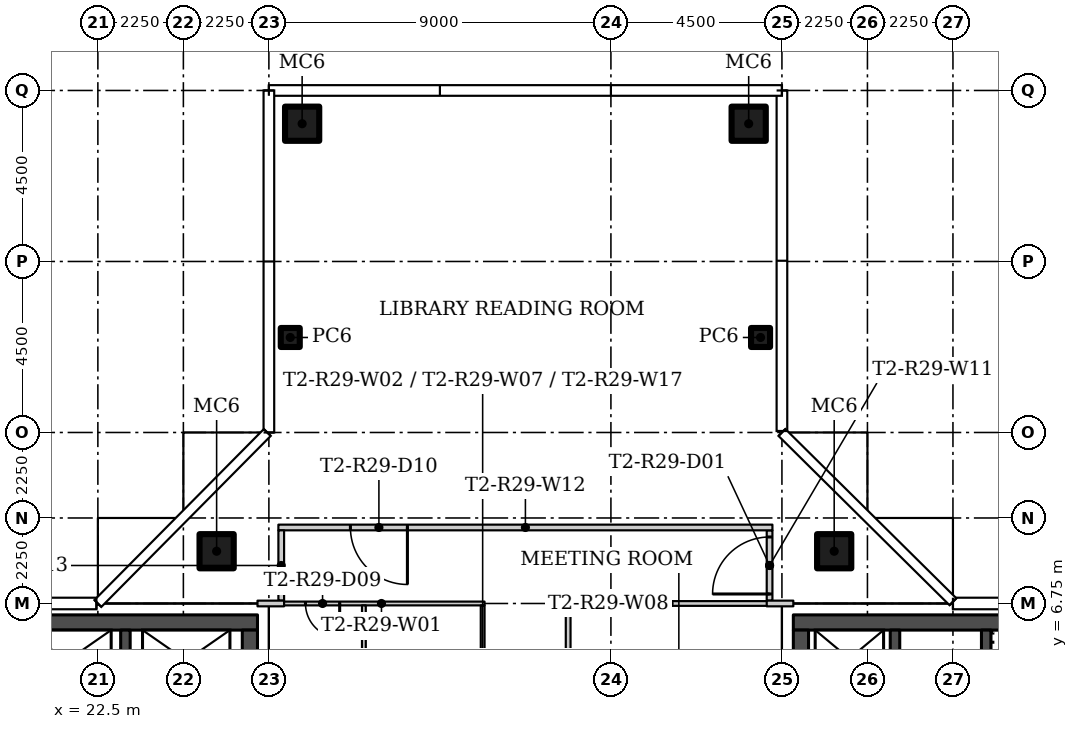
"""IFC4 building model, lengths in metres.
Left out: names, types, materials, properties, quantities, classifications, styles, units other than length and angle.
Written with IfcOpenShell. Run it as: python <this file> out.ifc"""

import sys

from ifc_helpers import new_model, si_unit, direction, frame, frame_2d, origin, origin_2d, place, context, subcontext, project, spatial, rectangle, hollow_rectangle, extrude, element, fill, save


model = new_model("IFC4")
c1 = context("Model", 3, precision=1e-05, world=origin(), true_north=direction((0.0, 1.0)))
c2 = subcontext(c1, "Body", "Model", "MODEL_VIEW")
j1 = project(units=[si_unit("LENGTHUNIT", "METRE"), si_unit("PLANEANGLEUNIT", "RADIAN")], contexts=[c1])
p1 = place(None, origin())
s1 = spatial("IfcSite", under=j1, at=p1, CompositionType="ELEMENT")
p2 = place(p1, origin())
s2 = spatial("IfcBuilding", under=s1, at=p2, CompositionType="ELEMENT")
p3 = place(p2, frame((0.0, 0.0, 261.6)))
s3 = spatial("IfcBuildingStorey", under=s2, at=p3, CompositionType="ELEMENT", Elevation=261.6)
for number, where in (
    (1, (25.625, 8.125, 0.0)),
    (2, (41.875, 8.125, 0.0)),
):
    element("IfcColumn", number, at=place(p3, frame(where)), inside=s3, PredefinedType="COLUMN", context=c2, shape_type="SweptSolid", body=[
        extrude(hollow_rectangle(XDim=0.9, YDim=0.9, WallThickness=0.036, at=origin_2d()), origin(), (0.0, 0.0, 1.0), 3.55),
    ])
p4 = place(p3, frame((39.938, 13.75, 0.0)))
e3 = element("IfcColumn", 3, at=p4, inside=s3, PredefinedType="COLUMN", context=c2, shape_type="SweptSolid", body=[
    extrude(hollow_rectangle(XDim=0.5, YDim=0.5, WallThickness=0.016, at=origin_2d()), origin(), (0.0, 0.0, 1.0), 3.55),
])
p5 = place(p3, frame((39.625, 19.375, 0.0)))
e4 = element("IfcColumn", 4, at=p5, inside=s3, PredefinedType="COLUMN", context=c2, shape_type="SweptSolid", body=[
    extrude(hollow_rectangle(XDim=0.9, YDim=0.9, WallThickness=0.036, at=origin_2d()), origin(), (0.0, 0.0, 1.0), 3.55),
])
p6 = place(p3, frame((27.562, 13.75, 0.0)))
e5 = element("IfcColumn", 5, at=p6, inside=s3, PredefinedType="COLUMN", context=c2, shape_type="SweptSolid", body=[
    extrude(hollow_rectangle(XDim=0.5, YDim=0.5, WallThickness=0.016, at=origin_2d()), origin(), (0.0, 0.0, 1.0), 3.55),
])
p7 = place(p3, frame((27.875, 19.375, 0.0)))
e6 = element("IfcColumn", 6, at=p7, inside=s3, PredefinedType="COLUMN", context=c2, shape_type="SweptSolid", body=[
    extrude(hollow_rectangle(XDim=0.9, YDim=0.9, WallThickness=0.036, at=origin_2d()), origin(), (0.0, 0.0, 1.0), 3.55),
])
p8 = place(p3, frame((32.675, 6.75, 0.0), z_axis=(0.0, 0.0, 1.0), x_axis=(-1.0, 0.0, 0.0)))
e7 = element("IfcWall", 7, at=p8, inside=s3, PredefinedType="PARTITIONING", context=c2, shape_type="SweptSolid", body=[
    extrude(rectangle(XDim=5.425, YDim=0.1, at=frame_2d((2.712, 0.0))), origin(), (0.0, 0.0, 1.0), 3.55),
])
p9 = place(p8, frame((3.812, 0.0, 0.0)))
e8 = element("IfcOpeningElement", 8, at=p9, cuts=e7, PredefinedType="OPENING", context=c2, shape_type="SweptSolid", body=[
    extrude(rectangle(XDim=0.9, YDim=2.1, at=frame_2d((0.45, 1.05))), frame((0.0, 0.06, 0.0), z_axis=(0.0, -1.0, 0.0), x_axis=(1.0, 0.0, 0.0)), (0.0, 0.0, 1.0), 0.12),
])
p10 = place(p3, frame((32.625, 2.5, 0.0), z_axis=(0.0, 0.0, 1.0), x_axis=(0.0, 1.0, 0.0)))
e9 = element("IfcWall", 9, at=p10, inside=s3, PredefinedType="PARTITIONING", context=c2, shape_type="SweptSolid", body=[
    extrude(rectangle(XDim=4.2, YDim=0.1, at=frame_2d((2.1, 0.0))), origin(), (0.0, 0.0, 1.0), 3.55),
])
p11 = place(p10, frame((1.65, 0.0, 0.0)))
e10 = element("IfcOpeningElement", 10, at=p11, cuts=e9, PredefinedType="OPENING", context=c2, shape_type="SweptSolid", body=[
    extrude(rectangle(XDim=0.9, YDim=2.1, at=frame_2d((0.45, 1.05))), frame((0.0, 0.06, 0.0), z_axis=(0.0, -1.0, 0.0), x_axis=(1.0, 0.0, 0.0)), (0.0, 0.0, 1.0), 0.12),
])
p12 = place(p3, frame((34.875, 6.688, 0.0), z_axis=(0.0, 0.0, 1.0), x_axis=(0.0, -1.0, 0.0)))
e11 = element("IfcWall", 11, at=p12, inside=s3, PredefinedType="PARTITIONING", context=c2, shape_type="SweptSolid", body=[
    extrude(rectangle(XDim=4.175, YDim=0.125, at=frame_2d((2.087, 0.0))), origin(), (0.0, 0.0, 1.0), 3.55),
])
p13 = place(p12, frame((1.637, 0.0, 0.0)))
e12 = element("IfcOpeningElement", 12, at=p13, cuts=e11, PredefinedType="OPENING", context=c2, shape_type="SweptSolid", body=[
    extrude(rectangle(XDim=0.9, YDim=2.1, at=frame_2d((0.45, 1.05))), frame((0.0, 0.073, 0.0), z_axis=(0.0, -1.0, 0.0), x_axis=(1.0, 0.0, 0.0)), (0.0, 0.0, 1.0), 0.145),
])
p14 = place(p3, frame((40.25, 6.75, 0.0), z_axis=(0.0, 0.0, 1.0), x_axis=(-1.0, 0.0, 0.0)))
e13 = element("IfcWall", 13, at=p14, inside=s3, PredefinedType="PARTITIONING", context=c2, shape_type="SweptSolid", body=[
    extrude(rectangle(XDim=5.437, YDim=0.125, at=frame_2d((2.719, 0.0))), origin(), (0.0, 0.0, 1.0), 3.55),
])
p15 = place(p3, frame((40.175, 6.825, 0.0), z_axis=(0.0, 0.0, 1.0), x_axis=(0.0, 1.0, 0.0)))
e14 = element("IfcWall", 14, at=p15, inside=s3, PredefinedType="PARTITIONING", context=c2, shape_type="SweptSolid", body=[
    extrude(rectangle(XDim=1.85, YDim=0.15, at=frame_2d((0.925, 0.0))), origin(), (0.0, 0.0, 1.0), 3.55),
])
p16 = place(p15, frame((0.175, 0.0, 0.0)))
e15 = element("IfcOpeningElement", 15, at=p16, cuts=e14, PredefinedType="OPENING", context=c2, shape_type="SweptSolid", body=[
    extrude(rectangle(XDim=1.5, YDim=2.1, at=frame_2d((0.75, 1.05))), frame((0.0, 0.085, 0.0), z_axis=(0.0, -1.0, 0.0), x_axis=(1.0, 0.0, 0.0)), (0.0, 0.0, 1.0), 0.17),
])
p17 = place(p3, frame((40.25, 8.75, 0.0), z_axis=(0.0, 0.0, 1.0), x_axis=(-1.0, 0.0, 0.0)))
e16 = element("IfcWall", 16, at=p17, inside=s3, PredefinedType="PARTITIONING", context=c2, shape_type="SweptSolid", body=[
    extrude(rectangle(XDim=13.0, YDim=0.15, at=frame_2d((6.5, 0.0))), origin(), (0.0, 0.0, 1.0), 3.55),
])
p18 = place(p17, frame((9.605, 0.0, 0.0)))
e17 = element("IfcOpeningElement", 17, at=p18, cuts=e16, PredefinedType="OPENING", context=c2, shape_type="SweptSolid", body=[
    extrude(rectangle(XDim=1.5, YDim=2.1, at=frame_2d((0.75, 1.05))), frame((0.0, 0.085, 0.0), z_axis=(0.0, -1.0, 0.0), x_axis=(1.0, 0.0, 0.0)), (0.0, 0.0, 1.0), 0.17),
])
p19 = place(p3, frame((27.325, 8.675, 0.0), z_axis=(0.0, 0.0, 1.0), x_axis=(0.0, -1.0, 0.0)))
e18 = element("IfcWall", 18, at=p19, inside=s3, PredefinedType="PARTITIONING", context=c2, shape_type="SweptSolid", body=[
    extrude(rectangle(XDim=1.85, YDim=0.15, at=frame_2d((0.925, 0.0))), origin(), (0.0, 0.0, 1.0), 3.55),
])
p20 = place(p3, frame((29.5, 6.7, 0.0), z_axis=(0.0, 0.0, 1.0), x_axis=(0.0, -1.0, 0.0)))
e19 = element("IfcWall", 19, at=p20, inside=s3, PredefinedType="PARTITIONING", context=c2, shape_type="SweptSolid", body=[
    extrude(rectangle(XDim=4.2, YDim=0.1, at=frame_2d((2.1, 0.0))), origin(), (0.0, 0.0, 1.0), 3.55),
])
for number, where, z_axis, x_axis in (
    (20, (27.4, 6.75, 0.0), (0.0, 0.0, 1.0), (-1.0, 0.0, 0.0)),
    (21, (40.8, 6.75, 0.0), (0.0, 0.0, 1.0), (-1.0, 0.0, 0.0)),
):
    element("IfcWall", number, at=place(p3, frame(where, z_axis=z_axis, x_axis=x_axis)), inside=s3, PredefinedType="PARTITIONING", context=c2, shape_type="SweptSolid", body=[
        extrude(rectangle(XDim=0.7, YDim=0.15, at=frame_2d((0.35, 0.0))), origin(), (0.0, 0.0, 1.0), 3.55),
    ])
p21 = place(p3, frame((13.8, 6.25, 0.0)))
e22 = element("IfcWall", 22, at=p21, inside=s3, PredefinedType="SHEAR", context=c2, shape_type="SweptSolid", body=[
    extrude(rectangle(XDim=12.9, YDim=0.4, at=frame_2d((6.45, 0.0))), origin(), (0.0, 0.0, 1.0), 3.55),
])
p22 = place(p3, frame((26.5, 6.05, 0.0), z_axis=(0.0, 0.0, 1.0), x_axis=(0.0, -1.0, 0.0)))
e23 = element("IfcWall", 23, at=p22, inside=s3, PredefinedType="SHEAR", context=c2, shape_type="SweptSolid", body=[
    extrude(rectangle(XDim=12.1, YDim=0.4, at=frame_2d((6.05, 0.0))), origin(), (0.0, 0.0, 1.0), 3.55),
])
p23 = place(p22, frame((10.1, 0.0, 0.0)))
e24 = element("IfcOpeningElement", 24, at=p23, cuts=e23, PredefinedType="OPENING", context=c2, shape_type="SweptSolid", body=[
    extrude(rectangle(XDim=1.2, YDim=2.1, at=frame_2d((0.6, 1.05))), frame((0.0, 0.21, 0.0), z_axis=(0.0, -1.0, 0.0), x_axis=(1.0, 0.0, 0.0)), (0.0, 0.0, 1.0), 0.42),
])
p24 = place(p22, frame((3.9, 0.0, 0.0)))
e25 = element("IfcOpeningElement", 25, at=p24, cuts=e23, PredefinedType="OPENING", context=c2, shape_type="SweptSolid", body=[
    extrude(rectangle(XDim=1.8, YDim=2.4, at=frame_2d((0.9, 1.2))), frame((0.0, 0.21, 0.0), z_axis=(0.0, -1.0, 0.0), x_axis=(1.0, 0.0, 0.0)), (0.0, 0.0, 1.0), 0.42),
])
p25 = place(p3, frame((23.225, 3.25, 0.0), z_axis=(0.0, 0.0, 1.0), x_axis=(0.0, 1.0, 0.0)))
e26 = element("IfcWall", 26, at=p25, inside=s3, PredefinedType="SHEAR", context=c2, shape_type="SweptSolid", body=[
    extrude(rectangle(XDim=2.8, YDim=0.25, at=frame_2d((1.4, 0.0))), origin(), (0.0, 0.0, 1.0), 3.55),
])
p26 = place(p3, frame((53.7, 6.25, 0.0), z_axis=(0.0, 0.0, 1.0), x_axis=(-1.0, 0.0, 0.0)))
e27 = element("IfcWall", 27, at=p26, inside=s3, PredefinedType="SHEAR", context=c2, shape_type="SweptSolid", body=[
    extrude(rectangle(XDim=12.9, YDim=0.4, at=frame_2d((6.45, 0.0))), origin(), (0.0, 0.0, 1.0), 3.55),
])
p27 = place(p3, frame((41.0, -6.05, 0.0), z_axis=(0.0, 0.0, 1.0), x_axis=(0.0, 1.0, 0.0)))
e28 = element("IfcWall", 28, at=p27, inside=s3, PredefinedType="SHEAR", context=c2, shape_type="SweptSolid", body=[
    extrude(rectangle(XDim=12.1, YDim=0.4, at=frame_2d((6.05, 0.0))), origin(), (0.0, 0.0, 1.0), 3.55),
])
p28 = place(p27, frame((0.8, 0.0, 0.0)))
e29 = element("IfcOpeningElement", 29, at=p28, cuts=e28, PredefinedType="OPENING", context=c2, shape_type="SweptSolid", body=[
    extrude(rectangle(XDim=1.2, YDim=2.1, at=frame_2d((0.6, 1.05))), frame((0.0, 0.21, 0.0), z_axis=(0.0, -1.0, 0.0), x_axis=(1.0, 0.0, 0.0)), (0.0, 0.0, 1.0), 0.42),
])
p29 = place(p27, frame((6.4, 0.0, 0.0)))
e30 = element("IfcOpeningElement", 30, at=p29, cuts=e28, PredefinedType="OPENING", context=c2, shape_type="SweptSolid", body=[
    extrude(rectangle(XDim=1.8, YDim=2.4, at=frame_2d((0.9, 1.2))), frame((0.0, 0.21, 0.0), z_axis=(0.0, -1.0, 0.0), x_axis=(1.0, 0.0, 0.0)), (0.0, 0.0, 1.0), 0.42),
])
for number, where, z_axis, x_axis in (
    (31, (45.875, 3.25, 0.0), (0.0, 0.0, 1.0), (0.0, 1.0, 0.0)),
    (32, (43.475, 3.25, 0.0), (0.0, 0.0, 1.0), (0.0, 1.0, 0.0)),
):
    element("IfcWall", number, at=place(p3, frame(where, z_axis=z_axis, x_axis=x_axis)), inside=s3, PredefinedType="SHEAR", context=c2, shape_type="SweptSolid", body=[
        extrude(rectangle(XDim=2.8, YDim=0.25, at=frame_2d((1.4, 0.0))), origin(), (0.0, 0.0, 1.0), 3.55),
    ])
p30 = place(p16, origin())
e33 = element("IfcDoor", 33, at=p30, inside=s3, OperationType="DOUBLE_DOOR_SINGLE_SWING", PredefinedType="DOOR", context=c2, shape_type="SweptSolid", body=[
    extrude(rectangle(XDim=1.5, YDim=2.1, at=frame_2d((0.75, 1.05))), frame((0.0, 0.025, 0.0), z_axis=(0.0, -1.0, 0.0), x_axis=(1.0, 0.0, 0.0)), (0.0, 0.0, 1.0), 0.05),
])
fill(e15, e33)
p31 = place(p9, origin())
e34 = element("IfcDoor", 34, at=p31, inside=s3, OperationType="SINGLE_SWING_LEFT", PredefinedType="DOOR", context=c2, shape_type="SweptSolid", body=[
    extrude(rectangle(XDim=0.9, YDim=2.1, at=frame_2d((0.45, 1.05))), frame((0.0, 0.025, 0.0), z_axis=(0.0, -1.0, 0.0), x_axis=(1.0, 0.0, 0.0)), (0.0, 0.0, 1.0), 0.05),
])
fill(e8, e34)
p32 = place(p18, origin())
e35 = element("IfcDoor", 35, at=p32, inside=s3, OperationType="DOUBLE_DOOR_SINGLE_SWING", PredefinedType="DOOR", context=c2, shape_type="SweptSolid", body=[
    extrude(rectangle(XDim=1.5, YDim=2.1, at=frame_2d((0.75, 1.05))), frame((0.0, 0.025, 0.0), z_axis=(0.0, -1.0, 0.0), x_axis=(1.0, 0.0, 0.0)), (0.0, 0.0, 1.0), 0.05),
])
fill(e17, e35)
save(model, sys.argv[1])
